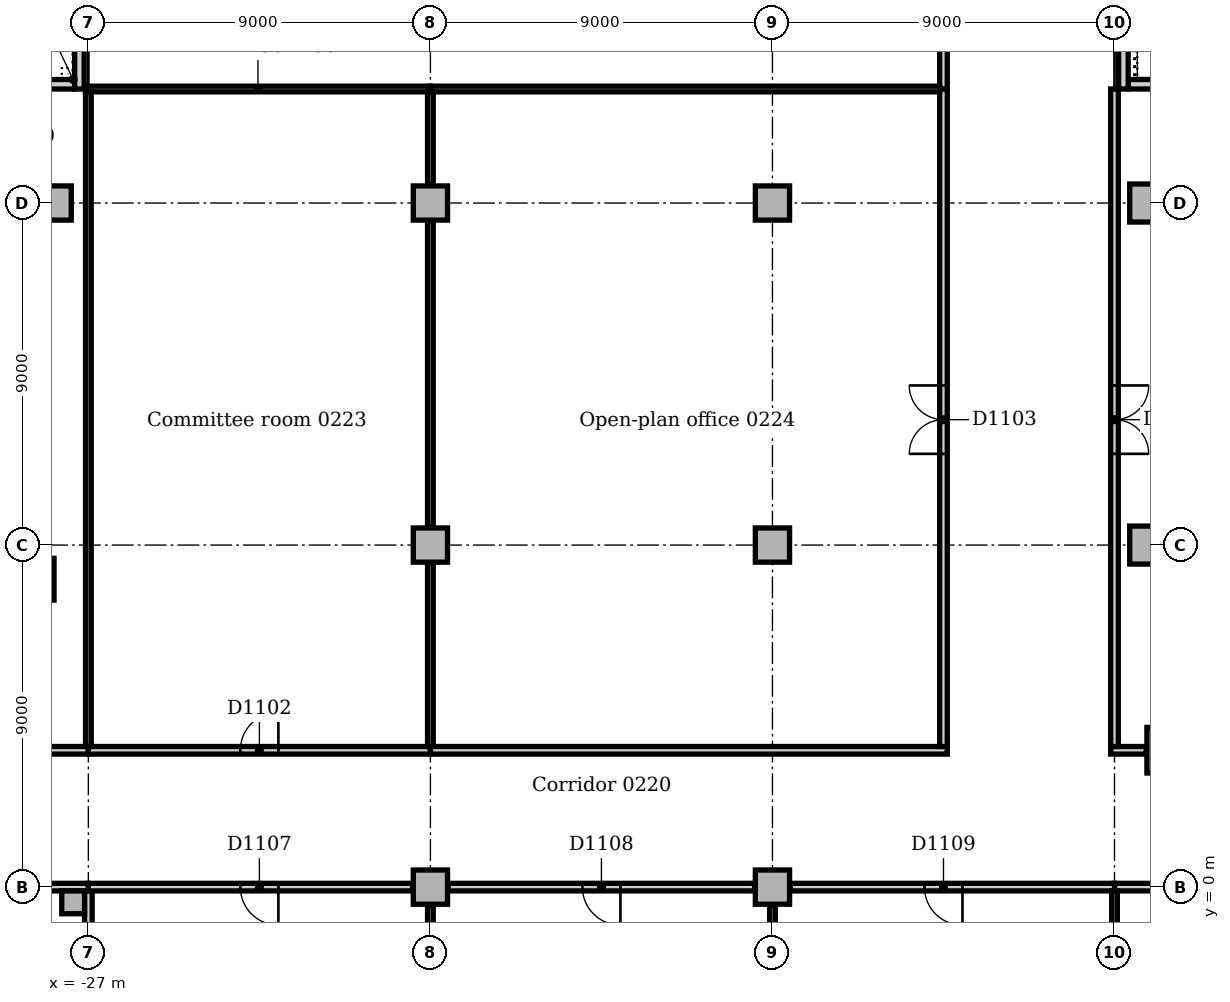
"""IFC4 building model, lengths in metres.
Left out: names, types, materials, properties, quantities, classifications, styles, units other than length and angle.
Written with IfcOpenShell. Run it as: python <this file> out.ifc"""

import sys

from ifc_helpers import new_model, si_unit, direction, frame, frame_2d, origin, origin_with_axes, origin_2d, place, context, subcontext, project, spatial, rectangle, extrude, element, fill, save


model = new_model("IFC4")
c1 = context("Model", 3, precision=1e-05, world=origin(), true_north=direction((0.0, 1.0)))
c2 = subcontext(c1, "Body", "Model", "MODEL_VIEW")
j1 = project(units=[si_unit("LENGTHUNIT", "METRE"), si_unit("PLANEANGLEUNIT", "RADIAN")], contexts=[c1])
p1 = place(None, origin())
s1 = spatial("IfcSite", under=j1, at=p1, CompositionType="ELEMENT")
p2 = place(p1, origin())
s2 = spatial("IfcBuilding", under=s1, at=p2, CompositionType="ELEMENT")
p3 = place(p2, frame((0.0, 0.0, 11.0)))
s3 = spatial("IfcBuildingStorey", under=s2, at=p3, CompositionType="ELEMENT", Elevation=11.0)
p4 = place(p3, frame((0.36, 21.125, 0.0), z_axis=(0.0, 0.0, 1.0), x_axis=(1.0, 0.0, 0.0)))
e1 = element("IfcWall", 1, at=p4, inside=s3, PredefinedType="SOLIDWALL", context=c2, shape_type="SweptSolid", body=[
    extrude(rectangle(XDim=3.54, YDim=0.25, at=frame_2d((1.77, 0.0))), origin(), (0.0, 0.0, 1.0), 5.0),
])
p5 = place(p3, frame((0.235, 21.0, 0.0), z_axis=(0.0, 0.0, 1.0), x_axis=(0.0, 1.0, 0.0)))
e2 = element("IfcWall", 2, at=p5, inside=s3, PredefinedType="SOLIDWALL", context=c2, shape_type="SweptSolid", body=[
    extrude(rectangle(XDim=21.0, YDim=0.25, at=frame_2d((10.5, 0.0))), origin(), (0.0, 0.0, 1.0), 5.0),
])
p6 = place(p3, frame((1.453, 3.602, 0.0), z_axis=(0.0, 0.0, 1.0), x_axis=(1.0, 0.0, 0.0)))
e3 = element("IfcColumn", 3, at=p6, inside=s3, PredefinedType="COLUMN", context=c2, shape_type="SweptSolid", body=[
    extrude(rectangle(XDim=1.2, YDim=1.2, at=origin_2d()), origin(), (0.0, 0.0, 1.0), 4.7),
])
for number, where, z_axis, x_axis in (
    (4, (0.9, 9.0, 0.0), (0.0, 0.0, 1.0), (1.0, 0.0, 0.0)),
    (5, (0.9, 18.0, 0.0), (0.0, 0.0, 1.0), (1.0, 0.0, 0.0)),
):
    element("IfcColumn", number, at=place(p3, frame(where, z_axis=z_axis, x_axis=x_axis)), inside=s3, PredefinedType="COLUMN", context=c2, shape_type="SweptSolid", body=[
        extrude(rectangle(XDim=1.0, YDim=1.0, at=origin_2d()), origin(), (0.0, 0.0, 1.0), 4.7),
    ])
p7 = place(p3, frame((-30.9, 21.125, 0.0), z_axis=(0.0, 0.0, 1.0), x_axis=(1.0, 0.0, 0.0)))
e6 = element("IfcWall", 6, at=p7, inside=s3, PredefinedType="SOLIDWALL", context=c2, shape_type="SweptSolid", body=[
    extrude(rectangle(XDim=3.54, YDim=0.25, at=frame_2d((1.77, 0.0))), origin(), (0.0, 0.0, 1.0), 5.0),
])
p8 = place(p3, frame((-27.235, 21.0, 0.0), z_axis=(0.0, 0.0, 1.0), x_axis=(0.0, 1.0, 0.0)))
e7 = element("IfcWall", 7, at=p8, inside=s3, PredefinedType="SOLIDWALL", context=c2, shape_type="SweptSolid", body=[
    extrude(rectangle(XDim=6.65, YDim=0.25, at=frame_2d((3.325, 0.0))), origin(), (0.0, 0.0, 1.0), 5.0),
])
p9 = place(p3, frame((-28.453, 8.102, 0.0), z_axis=(0.0, 0.0, 1.0), x_axis=(1.0, 0.0, 0.0)))
e8 = element("IfcColumn", 8, at=p9, inside=s3, PredefinedType="COLUMN", context=c2, shape_type="SweptSolid", body=[
    extrude(rectangle(XDim=1.1, YDim=1.1, at=origin_2d()), origin(), (0.0, 0.0, 1.0), 4.7),
])
for number, where, z_axis, x_axis in (
    (9, (-27.9, 18.0, 0.0), (0.0, 0.0, 1.0), (1.0, 0.0, 0.0)),
    (10, (-18.0, 0.0, 0.0), (0.0, 0.0, 1.0), (1.0, 0.0, 0.0)),
    (11, (-18.0, 9.0, 0.0), (0.0, 0.0, 1.0), (1.0, 0.0, 0.0)),
    (12, (-18.0, 18.0, 0.0), (0.0, 0.0, 1.0), (1.0, 0.0, 0.0)),
    (13, (-9.0, 0.0, 0.0), (0.0, 0.0, 1.0), (1.0, 0.0, 0.0)),
    (14, (-9.0, 9.0, 0.0), (0.0, 0.0, 1.0), (1.0, 0.0, 0.0)),
    (15, (-9.0, 18.0, 0.0), (0.0, 0.0, 1.0), (1.0, 0.0, 0.0)),
):
    element("IfcColumn", number, at=place(p3, frame(where, z_axis=z_axis, x_axis=x_axis)), inside=s3, PredefinedType="COLUMN", context=c2, shape_type="SweptSolid", body=[
        extrude(rectangle(XDim=0.9, YDim=0.9, at=origin_2d()), origin(), (0.0, 0.0, 1.0), 4.7),
    ])
p10 = place(p3, frame((-27.4, -0.4, 0.0), z_axis=(0.0, 0.0, 1.0), x_axis=(1.0, 0.0, 0.0)))
e16 = element("IfcColumn", 16, at=p10, inside=s3, PredefinedType="COLUMN", context=c2, shape_type="SweptSolid", body=[
    extrude(rectangle(XDim=0.6, YDim=0.6, at=origin_2d()), origin(), (0.0, 0.0, 1.0), 5.0),
])
p11 = place(p3, frame((-36.0, 0.0, 0.0), z_axis=(0.0, 0.0, 1.0), x_axis=(1.0, 0.0, 0.0)))
e17 = element("IfcWall", 17, at=p11, inside=s3, PredefinedType="SOLIDWALL", context=c2, shape_type="SweptSolid", body=[
    extrude(rectangle(XDim=9.0, YDim=0.2, at=frame_2d((4.5, 0.0))), origin(), (0.0, 0.0, 1.0), 4.7),
])
p12 = place(p11, frame((0.8, 0.0, 0.0)))
e18 = element("IfcOpeningElement", 18, at=p12, cuts=e17, PredefinedType="OPENING", context=c2, shape_type="SweptSolid", body=[
    extrude(rectangle(XDim=1.2, YDim=2.1, at=frame_2d((0.6, 1.05))), frame((0.0, 0.11, 0.0), z_axis=(0.0, -1.0, 0.0), x_axis=(1.0, 0.0, 0.0)), (0.0, 0.0, 1.0), 0.22),
])
p13 = place(p3, frame((-27.0, -4.65, 0.0), z_axis=(0.0, 0.0, 1.0), x_axis=(0.0, 1.0, 0.0)))
e19 = element("IfcWall", 19, at=p13, inside=s3, PredefinedType="SOLIDWALL", context=c2, shape_type="SweptSolid", body=[
    extrude(rectangle(XDim=4.55, YDim=0.2, at=frame_2d((2.275, 0.0))), origin(), (0.0, 0.0, 1.0), 4.7),
])
p14 = place(p3, frame((-36.0, 3.6, 0.0), z_axis=(0.0, 0.0, 1.0), x_axis=(1.0, 0.0, 0.0)))
e20 = element("IfcWall", 20, at=p14, inside=s3, PredefinedType="PARTITIONING", context=c2, shape_type="SweptSolid", body=[
    extrude(rectangle(XDim=9.0, YDim=0.2, at=frame_2d((4.5, 0.0))), origin(), (0.0, 0.0, 1.0), 4.7),
])
p15 = place(p14, frame((4.0, 0.0, 0.0)))
e21 = element("IfcOpeningElement", 21, at=p15, cuts=e20, PredefinedType="OPENING", context=c2, shape_type="SweptSolid", body=[
    extrude(rectangle(XDim=1.0, YDim=2.1, at=frame_2d((0.5, 1.05))), frame((0.0, 0.11, 0.0), z_axis=(0.0, -1.0, 0.0), x_axis=(1.0, 0.0, 0.0)), (0.0, 0.0, 1.0), 0.22),
])
p16 = place(p3, origin_with_axes())
e22 = element("IfcWall", 22, at=p16, inside=s3, PredefinedType="PARTITIONING", context=c2, shape_type="SweptSolid", body=[
    extrude(rectangle(XDim=9.0, YDim=0.2, at=frame_2d((4.5, 0.0))), origin(), (0.0, 0.0, 1.0), 4.7),
])
p17 = place(p16, frame((4.3, 0.0, 0.0)))
e23 = element("IfcOpeningElement", 23, at=p17, cuts=e22, PredefinedType="OPENING", context=c2, shape_type="SweptSolid", body=[
    extrude(rectangle(XDim=1.0, YDim=2.1, at=frame_2d((0.5, 1.05))), frame((0.0, 0.11, 0.0), z_axis=(0.0, -1.0, 0.0), x_axis=(1.0, 0.0, 0.0)), (0.0, 0.0, 1.0), 0.22),
])
p18 = place(p3, frame((-0.1, 3.6, 0.0), z_axis=(0.0, 0.0, 1.0), x_axis=(1.0, 0.0, 0.0)))
e24 = element("IfcWall", 24, at=p18, inside=s3, PredefinedType="PARTITIONING", context=c2, shape_type="SweptSolid", body=[
    extrude(rectangle(XDim=0.933, YDim=0.2, at=frame_2d((0.467, 0.0))), origin(), (0.0, 0.0, 1.0), 4.7),
])
p19 = place(p3, frame((-27.0, 3.6, 0.0), z_axis=(0.0, 0.0, 1.0), x_axis=(1.0, 0.0, 0.0)))
e25 = element("IfcWall", 25, at=p19, inside=s3, PredefinedType="PARTITIONING", context=c2, shape_type="SweptSolid", body=[
    extrude(rectangle(XDim=9.0, YDim=0.2, at=frame_2d((4.5, 0.0))), origin(), (0.0, 0.0, 1.0), 4.7),
])
p20 = place(p19, frame((4.0, 0.0, 0.0)))
e26 = element("IfcOpeningElement", 26, at=p20, cuts=e25, PredefinedType="OPENING", context=c2, shape_type="SweptSolid", body=[
    extrude(rectangle(XDim=1.0, YDim=2.1, at=frame_2d((0.5, 1.05))), frame((0.0, 0.11, 0.0), z_axis=(0.0, -1.0, 0.0), x_axis=(1.0, 0.0, 0.0)), (0.0, 0.0, 1.0), 0.22),
])
p21 = place(p3, frame((-18.0, 3.6, 0.0), z_axis=(0.0, 0.0, 1.0), x_axis=(1.0, 0.0, 0.0)))
e27 = element("IfcWall", 27, at=p21, inside=s3, PredefinedType="PARTITIONING", context=c2, shape_type="SweptSolid", body=[
    extrude(rectangle(XDim=13.6, YDim=0.2, at=frame_2d((6.8, 0.0))), origin(), (0.0, 0.0, 1.0), 4.7),
])
p22 = place(p3, frame((-27.0, 0.0, 0.0), z_axis=(0.0, 0.0, 1.0), x_axis=(1.0, 0.0, 0.0)))
e28 = element("IfcWall", 28, at=p22, inside=s3, PredefinedType="PARTITIONING", context=c2, shape_type="SweptSolid", body=[
    extrude(rectangle(XDim=8.53, YDim=0.2, at=frame_2d((4.265, 0.0))), origin(), (0.0, 0.0, 1.0), 4.7),
])
p23 = place(p22, frame((4.0, 0.0, 0.0)))
e29 = element("IfcOpeningElement", 29, at=p23, cuts=e28, PredefinedType="OPENING", context=c2, shape_type="SweptSolid", body=[
    extrude(rectangle(XDim=1.0, YDim=2.1, at=frame_2d((0.5, 1.05))), frame((0.0, 0.11, 0.0), z_axis=(0.0, -1.0, 0.0), x_axis=(1.0, 0.0, 0.0)), (0.0, 0.0, 1.0), 0.22),
])
p24 = place(p3, frame((-17.53, 0.0, 0.0), z_axis=(0.0, 0.0, 1.0), x_axis=(1.0, 0.0, 0.0)))
e30 = element("IfcWall", 30, at=p24, inside=s3, PredefinedType="PARTITIONING", context=c2, shape_type="SweptSolid", body=[
    extrude(rectangle(XDim=8.06, YDim=0.2, at=frame_2d((4.03, 0.0))), origin(), (0.0, 0.0, 1.0), 4.7),
])
p25 = place(p24, frame((3.53, 0.0, 0.0)))
e31 = element("IfcOpeningElement", 31, at=p25, cuts=e30, PredefinedType="OPENING", context=c2, shape_type="SweptSolid", body=[
    extrude(rectangle(XDim=1.0, YDim=2.1, at=frame_2d((0.5, 1.05))), frame((0.0, 0.11, 0.0), z_axis=(0.0, -1.0, 0.0), x_axis=(1.0, 0.0, 0.0)), (0.0, 0.0, 1.0), 0.22),
])
p26 = place(p3, frame((-8.53, 0.0, 0.0), z_axis=(0.0, 0.0, 1.0), x_axis=(1.0, 0.0, 0.0)))
e32 = element("IfcWall", 32, at=p26, inside=s3, PredefinedType="PARTITIONING", context=c2, shape_type="SweptSolid", body=[
    extrude(rectangle(XDim=8.53, YDim=0.2, at=frame_2d((4.265, 0.0))), origin(), (0.0, 0.0, 1.0), 4.7),
])
p27 = place(p26, frame((3.53, 0.0, 0.0)))
e33 = element("IfcOpeningElement", 33, at=p27, cuts=e32, PredefinedType="OPENING", context=c2, shape_type="SweptSolid", body=[
    extrude(rectangle(XDim=1.0, YDim=2.1, at=frame_2d((0.5, 1.05))), frame((0.0, 0.11, 0.0), z_axis=(0.0, -1.0, 0.0), x_axis=(1.0, 0.0, 0.0)), (0.0, 0.0, 1.0), 0.22),
])
p28 = place(p3, frame((-4.5, 21.0, 0.0), z_axis=(0.0, 0.0, 1.0), x_axis=(0.0, 1.0, 0.0)))
e34 = element("IfcWall", 34, at=p28, inside=s3, PredefinedType="PARTITIONING", context=c2, shape_type="SweptSolid", body=[
    extrude(rectangle(XDim=23.9, YDim=0.2, at=frame_2d((11.95, 0.0))), origin(), (0.0, 0.0, 1.0), 4.7),
])
p29 = place(p3, frame((-4.5, 3.7, 0.0), z_axis=(0.0, 0.0, 1.0), x_axis=(0.0, 1.0, 0.0)))
e35 = element("IfcWall", 35, at=p29, inside=s3, PredefinedType="PARTITIONING", context=c2, shape_type="SweptSolid", body=[
    extrude(rectangle(XDim=17.3, YDim=0.2, at=frame_2d((8.65, 0.0))), origin(), (0.0, 0.0, 1.0), 4.7),
])
p30 = place(p29, frame((7.7, 0.0, 0.0)))
e36 = element("IfcOpeningElement", 36, at=p30, cuts=e35, PredefinedType="OPENING", context=c2, shape_type="SweptSolid", body=[
    extrude(rectangle(XDim=1.8, YDim=2.1, at=frame_2d((0.9, 1.05))), frame((0.0, 0.11, 0.0), z_axis=(0.0, -1.0, 0.0), x_axis=(1.0, 0.0, 0.0)), (0.0, 0.0, 1.0), 0.22),
])
p31 = place(p3, frame((0.0, 3.7, 0.0), z_axis=(0.0, 0.0, 1.0), x_axis=(0.0, 1.0, 0.0)))
e37 = element("IfcWall", 37, at=p31, inside=s3, PredefinedType="PARTITIONING", context=c2, shape_type="SweptSolid", body=[
    extrude(rectangle(XDim=17.3, YDim=0.2, at=frame_2d((8.65, 0.0))), origin(), (0.0, 0.0, 1.0), 4.7),
])
p32 = place(p31, frame((7.7, 0.0, 0.0)))
e38 = element("IfcOpeningElement", 38, at=p32, cuts=e37, PredefinedType="OPENING", context=c2, shape_type="SweptSolid", body=[
    extrude(rectangle(XDim=1.8, YDim=2.1, at=frame_2d((0.9, 1.05))), frame((0.0, 0.11, 0.0), z_axis=(0.0, -1.0, 0.0), x_axis=(1.0, 0.0, 0.0)), (0.0, 0.0, 1.0), 0.22),
])
p33 = place(p3, frame((-27.075, 21.0, 0.0), z_axis=(0.0, 0.0, 1.0), x_axis=(1.0, 0.0, 0.0)))
e39 = element("IfcWall", 39, at=p33, inside=s3, PredefinedType="PARTITIONING", context=c2, shape_type="SweptSolid", body=[
    extrude(rectangle(XDim=9.075, YDim=0.15, at=frame_2d((4.537, 0.0))), origin(), (0.0, 0.0, 1.0), 4.7),
])
p34 = place(p3, frame((-18.0, 21.0, 0.0), z_axis=(0.0, 0.0, 1.0), x_axis=(1.0, 0.0, 0.0)))
e40 = element("IfcWall", 40, at=p34, inside=s3, PredefinedType="PARTITIONING", context=c2, shape_type="SweptSolid", body=[
    extrude(rectangle(XDim=13.4, YDim=0.15, at=frame_2d((6.7, 0.0))), origin(), (0.0, 0.0, 1.0), 4.7),
])
p35 = place(p3, frame((-18.0, 3.7, 0.0), z_axis=(0.0, 0.0, 1.0), x_axis=(0.0, 1.0, 0.0)))
e41 = element("IfcWall", 41, at=p35, inside=s3, PredefinedType="PARTITIONING", context=c2, shape_type="SweptSolid", body=[
    extrude(rectangle(XDim=4.83, YDim=0.15, at=frame_2d((2.415, 0.0))), origin(), (0.0, 0.0, 1.0), 4.7),
])
p36 = place(p3, frame((-18.0, 9.47, 0.0), z_axis=(0.0, 0.0, 1.0), x_axis=(0.0, 1.0, 0.0)))
e42 = element("IfcWall", 42, at=p36, inside=s3, PredefinedType="PARTITIONING", context=c2, shape_type="SweptSolid", body=[
    extrude(rectangle(XDim=8.06, YDim=0.15, at=frame_2d((4.03, 0.0))), origin(), (0.0, 0.0, 1.0), 4.7),
])
p37 = place(p3, frame((-18.0, 18.47, 0.0), z_axis=(0.0, 0.0, 1.0), x_axis=(0.0, 1.0, 0.0)))
e43 = element("IfcWall", 43, at=p37, inside=s3, PredefinedType="PARTITIONING", context=c2, shape_type="SweptSolid", body=[
    extrude(rectangle(XDim=2.455, YDim=0.15, at=frame_2d((1.228, 0.0))), origin(), (0.0, 0.0, 1.0), 4.7),
])
p38 = place(p3, frame((-27.0, 3.7, 0.0), z_axis=(0.0, 0.0, 1.0), x_axis=(0.0, 1.0, 0.0)))
e44 = element("IfcWall", 44, at=p38, inside=s3, PredefinedType="PARTITIONING", context=c2, shape_type="SweptSolid", body=[
    extrude(rectangle(XDim=17.225, YDim=0.15, at=frame_2d((8.613, 0.0))), origin(), (0.0, 0.0, 1.0), 4.7),
])
for number, where, z_axis, x_axis in (
    (45, (-18.0, -8.53, 0.0), (0.0, 0.0, 1.0), (0.0, 1.0, 0.0)),
    (46, (-9.0, -8.53, 0.0), (0.0, 0.0, 1.0), (0.0, 1.0, 0.0)),
):
    element("IfcWall", number, at=place(p3, frame(where, z_axis=z_axis, x_axis=x_axis)), inside=s3, PredefinedType="PARTITIONING", context=c2, shape_type="SweptSolid", body=[
        extrude(rectangle(XDim=8.06, YDim=0.15, at=frame_2d((4.03, 0.0))), origin(), (0.0, 0.0, 1.0), 4.7),
    ])
p39 = place(p3, frame((0.0, -8.53, 0.0), z_axis=(0.0, 0.0, 1.0), x_axis=(0.0, 1.0, 0.0)))
e47 = element("IfcWall", 47, at=p39, inside=s3, PredefinedType="PARTITIONING", context=c2, shape_type="SweptSolid", body=[
    extrude(rectangle(XDim=8.43, YDim=0.15, at=frame_2d((4.215, 0.0))), origin(), (0.0, 0.0, 1.0), 4.7),
])
p40 = place(p3, frame((0.48, 21.25, 0.0), z_axis=(0.0, 0.0, 1.0), x_axis=(0.0, 1.0, 0.0)))
e48 = element("IfcWall", 48, at=p40, inside=s3, PredefinedType="STANDARD", context=c2, shape_type="SweptSolid", body=[
    extrude(rectangle(XDim=1.955, YDim=0.24, at=frame_2d((0.978, 0.0))), origin(), (0.0, 0.0, 1.0), 5.0),
])
p41 = place(p20, origin())
e49 = element("IfcDoor", 49, at=p41, inside=s3, OperationType="SINGLE_SWING_RIGHT", PredefinedType="DOOR", context=c2, shape_type="SweptSolid", body=[
    extrude(rectangle(XDim=1.0, YDim=2.1, at=frame_2d((0.5, 1.05))), frame((0.0, 0.025, 0.0), z_axis=(0.0, -1.0, 0.0), x_axis=(1.0, 0.0, 0.0)), (0.0, 0.0, 1.0), 0.05),
])
fill(e26, e49)
p42 = place(p30, origin())
e50 = element("IfcDoor", 50, at=p42, inside=s3, OperationType="DOUBLE_DOOR_SINGLE_SWING", PredefinedType="DOOR", context=c2, shape_type="SweptSolid", body=[
    extrude(rectangle(XDim=1.8, YDim=2.1, at=frame_2d((0.9, 1.05))), frame((0.0, 0.025, 0.0), z_axis=(0.0, -1.0, 0.0), x_axis=(1.0, 0.0, 0.0)), (0.0, 0.0, 1.0), 0.05),
])
fill(e36, e50)
p43 = place(p23, frame((1.0, 0.0, 0.0), z_axis=(0.0, 0.0, 1.0), x_axis=(-1.0, 0.0, 0.0)))
e51 = element("IfcDoor", 51, at=p43, inside=s3, OperationType="SINGLE_SWING_LEFT", PredefinedType="DOOR", context=c2, shape_type="SweptSolid", body=[
    extrude(rectangle(XDim=1.0, YDim=2.1, at=frame_2d((0.5, 1.05))), frame((0.0, 0.025, 0.0), z_axis=(0.0, -1.0, 0.0), x_axis=(1.0, 0.0, 0.0)), (0.0, 0.0, 1.0), 0.05),
])
fill(e29, e51)
p44 = place(p25, frame((1.0, 0.0, 0.0), z_axis=(0.0, 0.0, 1.0), x_axis=(-1.0, 0.0, 0.0)))
e52 = element("IfcDoor", 52, at=p44, inside=s3, OperationType="SINGLE_SWING_LEFT", PredefinedType="DOOR", context=c2, shape_type="SweptSolid", body=[
    extrude(rectangle(XDim=1.0, YDim=2.1, at=frame_2d((0.5, 1.05))), frame((0.0, 0.025, 0.0), z_axis=(0.0, -1.0, 0.0), x_axis=(1.0, 0.0, 0.0)), (0.0, 0.0, 1.0), 0.05),
])
fill(e31, e52)
p45 = place(p27, frame((1.0, 0.0, 0.0), z_axis=(0.0, 0.0, 1.0), x_axis=(-1.0, 0.0, 0.0)))
e53 = element("IfcDoor", 53, at=p45, inside=s3, OperationType="SINGLE_SWING_LEFT", PredefinedType="DOOR", context=c2, shape_type="SweptSolid", body=[
    extrude(rectangle(XDim=1.0, YDim=2.1, at=frame_2d((0.5, 1.05))), frame((0.0, 0.025, 0.0), z_axis=(0.0, -1.0, 0.0), x_axis=(1.0, 0.0, 0.0)), (0.0, 0.0, 1.0), 0.05),
])
fill(e33, e53)
p46 = place(p32, frame((1.8, 0.0, 0.0), z_axis=(0.0, 0.0, 1.0), x_axis=(-1.0, 0.0, 0.0)))
e54 = element("IfcDoor", 54, at=p46, inside=s3, OperationType="DOUBLE_DOOR_SINGLE_SWING", PredefinedType="DOOR", context=c2, shape_type="SweptSolid", body=[
    extrude(rectangle(XDim=1.8, YDim=2.1, at=frame_2d((0.9, 1.05))), frame((0.0, 0.025, 0.0), z_axis=(0.0, -1.0, 0.0), x_axis=(1.0, 0.0, 0.0)), (0.0, 0.0, 1.0), 0.05),
])
fill(e38, e54)
save(model, sys.argv[1])
